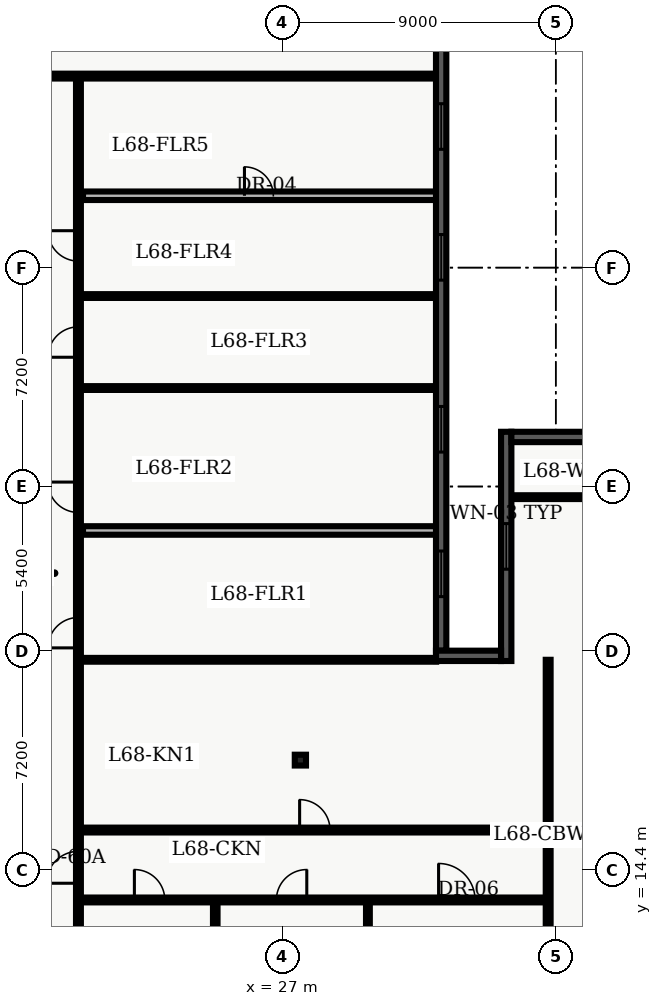
"""IFC4 building model, lengths in metres.
Left out: names, types, materials, properties, quantities, classifications, styles, units other than length and angle.
Written with IfcOpenShell. Run it as: python <this file> out.ifc"""

import sys

from ifc_helpers import new_model, entity, si_unit, converted_unit, direction, frame, origin_with_axes, origin_2d_with_axis, place, context, subcontext, project, spatial, polyline, rectangle, i_section, outline, extrude, element, fill, save


model = new_model("IFC4")
c1 = context("Model", 3, precision=1e-05, world=origin_with_axes(), true_north=direction((0.0, 1.0)))
c2 = subcontext(c1, "Body", "Model", "MODEL_VIEW")
j1 = project(units=[si_unit("LENGTHUNIT", "METRE"), converted_unit("PLANEANGLEUNIT", "DEGREE", entity("IfcPlaneAngleMeasure", 0.017), si_unit("PLANEANGLEUNIT", "RADIAN"), dimensions=[0, 0, 0, 0, 0, 0, 0])], contexts=[c1])
p1 = place(None, origin_with_axes())
s1 = spatial("IfcSite", under=j1, at=p1, CompositionType="ELEMENT")
p2 = place(p1, origin_with_axes())
s2 = spatial("IfcBuilding", under=s1, at=p2, CompositionType="ELEMENT")
p3 = place(p2, frame((0.0, 0.0, 276.3), z_axis=(0.0, 0.0, 1.0), x_axis=(1.0, 0.0, 0.0)))
s3 = spatial("IfcBuildingStorey", under=s2, at=p3, CompositionType="ELEMENT", Elevation=276.3)
p4 = place(p3, frame((27.6, 18.0, 0.0), z_axis=(0.0, 0.0, 1.0), x_axis=(1.0, 0.0, 0.0)))
e1 = element("IfcColumn", 1, at=p4, inside=s3, PredefinedType="COLUMN", context=c2, shape_type="SweptSolid", body=[
    extrude(i_section(OverallWidth=0.369, OverallDepth=0.356, WebThickness=0.011, FlangeThickness=0.018, FilletRadius=0.018, at=origin_2d_with_axis()), origin_with_axes(), (0.0, 0.0, 1.0), 3.9),
])
p5 = place(p3, frame((8.135, 40.5, 0.0), z_axis=(0.0, 0.0, 1.0), x_axis=(1.0, 0.0, 0.0)))
e2 = element("IfcWall", 2, at=p5, inside=s3, PredefinedType="PARTITIONING", context=c2, shape_type="SweptSolid", body=[
    extrude(outline(polyline([(0.0, -0.08), (23.93, -0.08), (23.93, 0.08), (0.0, 0.08), (0.0, -0.08)])), origin_with_axes(), (0.0, 0.0, 1.0), 2.7),
])
p6 = place(p5, frame((0.876, 0.0, 0.0), z_axis=(0.0, 0.0, 1.0), x_axis=(1.0, 0.0, 0.0)))
e3 = element("IfcOpeningElement", 3, at=p6, cuts=e2, PredefinedType="OPENING", context=c2, shape_type="SweptSolid", body=[
    extrude(rectangle(XDim=1.0, YDim=0.18, at=origin_2d_with_axis()), origin_with_axes(), (0.0, 0.0, 1.0), 2.15),
])
p7 = place(p5, frame((5.457, 0.0, 0.0), z_axis=(0.0, 0.0, 1.0), x_axis=(1.0, 0.0, 0.0)))
e4 = element("IfcOpeningElement", 4, at=p7, cuts=e2, PredefinedType="OPENING", context=c2, shape_type="SweptSolid", body=[
    extrude(rectangle(XDim=1.0, YDim=0.18, at=origin_2d_with_axis()), origin_with_axes(), (0.0, 0.0, 1.0), 2.15),
])
p8 = place(p5, frame((9.7, 0.0, 0.0), z_axis=(0.0, 0.0, 1.0), x_axis=(1.0, 0.0, 0.0)))
e5 = element("IfcOpeningElement", 5, at=p8, cuts=e2, PredefinedType="OPENING", context=c2, shape_type="SweptSolid", body=[
    extrude(rectangle(XDim=1.0, YDim=0.18, at=origin_2d_with_axis()), origin_with_axes(), (0.0, 0.0, 1.0), 2.15),
])
p9 = place(p3, frame((20.3, 7.8, 0.0), z_axis=(0.0, 0.0, 1.0), x_axis=(0.0, 1.0, 0.0)))
e6 = element("IfcWall", 6, at=p9, inside=s3, PredefinedType="PARTITIONING", context=c2, shape_type="SweptSolid", body=[
    extrude(outline(polyline([(0.0, -0.08), (32.7, -0.08), (32.7, 0.08), (0.0, 0.08), (0.0, -0.08)])), origin_with_axes(), (0.0, 0.0, 1.0), 2.7),
])
p10 = place(p9, frame((14.392, 0.0, 0.0), z_axis=(0.0, 0.0, 1.0), x_axis=(1.0, 0.0, 0.0)))
e7 = element("IfcOpeningElement", 7, at=p10, cuts=e6, PredefinedType="OPENING", context=c2, shape_type="SweptSolid", body=[
    extrude(rectangle(XDim=1.0, YDim=0.18, at=origin_2d_with_axis()), origin_with_axes(), (0.0, 0.0, 1.0), 2.15),
])
p11 = place(p9, frame((18.846, 0.0, 0.0), z_axis=(0.0, 0.0, 1.0), x_axis=(1.0, 0.0, 0.0)))
e8 = element("IfcOpeningElement", 8, at=p11, cuts=e6, PredefinedType="OPENING", context=c2, shape_type="SweptSolid", body=[
    extrude(rectangle(XDim=1.0, YDim=0.18, at=origin_2d_with_axis()), origin_with_axes(), (0.0, 0.0, 1.0), 2.15),
])
p12 = place(p9, frame((23.952, 0.0, 0.0), z_axis=(0.0, 0.0, 1.0), x_axis=(1.0, 0.0, 0.0)))
e9 = element("IfcOpeningElement", 9, at=p12, cuts=e6, PredefinedType="OPENING", context=c2, shape_type="SweptSolid", body=[
    extrude(rectangle(XDim=1.0, YDim=0.18, at=origin_2d_with_axis()), origin_with_axes(), (0.0, 0.0, 1.0), 2.15),
])
p13 = place(p9, frame((27.114, 0.0, 0.0), z_axis=(0.0, 0.0, 1.0), x_axis=(1.0, 0.0, 0.0)))
e10 = element("IfcOpeningElement", 10, at=p13, cuts=e6, PredefinedType="OPENING", context=c2, shape_type="SweptSolid", body=[
    extrude(rectangle(XDim=1.0, YDim=0.18, at=origin_2d_with_axis()), origin_with_axes(), (0.0, 0.0, 1.0), 2.15),
])
p14 = place(p9, frame((6.675, 0.0, 0.0), z_axis=(0.0, 0.0, 1.0), x_axis=(1.0, 0.0, 0.0)))
e11 = element("IfcOpeningElement", 11, at=p14, cuts=e6, PredefinedType="OPENING", context=c2, shape_type="SweptSolid", body=[
    extrude(rectangle(XDim=1.05, YDim=0.18, at=origin_2d_with_axis()), origin_with_axes(), (0.0, 0.0, 1.0), 2.15),
])
p15 = place(p3, frame((20.45, 25.554, 0.0), z_axis=(0.0, 0.0, 1.0), x_axis=(1.0, 0.0, 0.0)))
e12 = element("IfcWall", 12, at=p15, inside=s3, PredefinedType="PARTITIONING", context=c2, shape_type="SweptSolid", body=[
    extrude(outline(polyline([(0.0, -0.14), (11.615, -0.14), (11.615, 0.14), (0.0, 0.14), (0.0, -0.14)])), origin_with_axes(), (0.0, 0.0, 1.0), 2.7),
])
for number, where, z_axis, x_axis in (
    (13, (20.45, 30.239, 0.0), (0.0, 0.0, 1.0), (1.0, 0.0, 0.0)),
    (14, (20.45, 33.265, 0.0), (0.0, 0.0, 1.0), (1.0, 0.0, 0.0)),
):
    element("IfcWall", number, at=place(p3, frame(where, z_axis=z_axis, x_axis=x_axis)), inside=s3, PredefinedType="PARTITIONING", context=c2, shape_type="SweptSolid", body=[
        extrude(outline(polyline([(0.0, -0.062), (11.615, -0.062), (11.615, 0.062), (0.0, 0.062), (0.0, -0.062)])), origin_with_axes(), (0.0, 0.0, 1.0), 2.7),
    ])
p16 = place(p3, frame((20.45, 36.564, 0.0), z_axis=(0.0, 0.0, 1.0), x_axis=(1.0, 0.0, 0.0)))
e15 = element("IfcWall", 15, at=p16, inside=s3, PredefinedType="PARTITIONING", context=c2, shape_type="SweptSolid", body=[
    extrude(outline(polyline([(0.0, -0.14), (11.615, -0.14), (11.615, 0.14), (0.0, 0.14), (0.0, -0.14)])), origin_with_axes(), (0.0, 0.0, 1.0), 2.7),
])
p17 = place(p16, frame((5.785, 0.0, 0.0), z_axis=(0.0, 0.0, 1.0), x_axis=(1.0, 0.0, 0.0)))
e16 = element("IfcOpeningElement", 16, at=p17, cuts=e15, PredefinedType="OPENING", context=c2, shape_type="SweptSolid", body=[
    extrude(rectangle(XDim=0.95, YDim=0.3, at=origin_2d_with_axis()), origin_with_axes(), (0.0, 0.0, 1.0), 2.15),
])
p18 = place(p3, frame((20.3, 13.4, 0.0), z_axis=(0.0, 0.0, 1.0), x_axis=(1.0, 0.0, 0.0)))
e17 = element("IfcWall", 17, at=p18, inside=s3, PredefinedType="PARTITIONING", context=c2, shape_type="SweptSolid", body=[
    extrude(outline(polyline([(0.0, -0.08), (15.45, -0.08), (15.45, 0.08), (0.0, 0.08), (0.0, -0.08)])), origin_with_axes(), (0.0, 0.0, 1.0), 2.7),
])
p19 = place(p18, frame((2.34, 0.0, 0.0), z_axis=(0.0, 0.0, 1.0), x_axis=(1.0, 0.0, 0.0)))
e18 = element("IfcOpeningElement", 18, at=p19, cuts=e17, PredefinedType="OPENING", context=c2, shape_type="SweptSolid", body=[
    extrude(rectangle(XDim=1.0, YDim=0.18, at=origin_2d_with_axis()), origin_with_axes(), (0.0, 0.0, 1.0), 2.15),
])
p20 = place(p18, frame((7.011, 0.0, 0.0), z_axis=(0.0, 0.0, 1.0), x_axis=(1.0, 0.0, 0.0)))
e19 = element("IfcOpeningElement", 19, at=p20, cuts=e17, PredefinedType="OPENING", context=c2, shape_type="SweptSolid", body=[
    extrude(rectangle(XDim=1.0, YDim=0.18, at=origin_2d_with_axis()), origin_with_axes(), (0.0, 0.0, 1.0), 2.15),
])
p21 = place(p18, frame((12.445, 0.0, 0.0), z_axis=(0.0, 0.0, 1.0), x_axis=(1.0, 0.0, 0.0)))
e20 = element("IfcOpeningElement", 20, at=p21, cuts=e17, PredefinedType="OPENING", context=c2, shape_type="SweptSolid", body=[
    extrude(rectangle(XDim=1.2, YDim=0.18, at=origin_2d_with_axis()), origin_with_axes(), (0.0, 0.0, 1.0), 2.2),
])
p22 = place(p3, frame((20.3, 15.7, 0.0), z_axis=(0.0, 0.0, 1.0), x_axis=(1.0, 0.0, 0.0)))
e21 = element("IfcWall", 21, at=p22, inside=s3, PredefinedType="PARTITIONING", context=c2, shape_type="SweptSolid", body=[
    extrude(outline(polyline([(0.0, -0.08), (15.45, -0.08), (15.45, 0.08), (0.0, 0.08), (0.0, -0.08)])), origin_with_axes(), (0.0, 0.0, 1.0), 2.7),
])
p23 = place(p22, frame((7.775, 0.0, 0.0), z_axis=(0.0, 0.0, 1.0), x_axis=(1.0, 0.0, 0.0)))
e22 = element("IfcOpeningElement", 22, at=p23, cuts=e21, PredefinedType="OPENING", context=c2, shape_type="SweptSolid", body=[
    extrude(rectangle(XDim=1.0, YDim=0.18, at=origin_2d_with_axis()), origin_with_axes(), (0.0, 0.0, 1.0), 2.15),
])
p24 = place(p3, frame((35.75, 4.35, 0.0), z_axis=(0.0, 0.0, 1.0), x_axis=(0.0, 1.0, 0.0)))
e23 = element("IfcWall", 23, at=p24, inside=s3, PredefinedType="PARTITIONING", context=c2, shape_type="SweptSolid", body=[
    extrude(outline(polyline([(0.0, -0.08), (16.95, -0.08), (16.95, 0.08), (0.0, 0.08), (0.0, -0.08)])), origin_with_axes(), (0.0, 0.0, 1.0), 2.7),
])
p25 = place(p3, frame((24.8, 0.335, 0.0), z_axis=(0.0, 0.0, 1.0), x_axis=(0.0, 1.0, 0.0)))
e24 = element("IfcWall", 24, at=p25, inside=s3, PredefinedType="PARTITIONING", context=c2, shape_type="SweptSolid", body=[
    extrude(outline(polyline([(0.0, -0.075), (12.945, -0.075), (12.945, 0.075), (0.0, 0.075), (0.0, -0.075)])), origin_with_axes(), (0.0, 0.0, 1.0), 2.7),
])
p26 = place(p3, frame((29.821, 0.335, 0.0), z_axis=(0.0, 0.0, 1.0), x_axis=(0.0, 1.0, 0.0)))
e25 = element("IfcWall", 25, at=p26, inside=s3, PredefinedType="PARTITIONING", context=c2, shape_type="SweptSolid", body=[
    extrude(outline(polyline([(0.0, -0.062), (12.945, -0.062), (12.945, 0.062), (0.0, 0.062), (0.0, -0.062)])), origin_with_axes(), (0.0, 0.0, 1.0), 2.7),
])
p27 = place(p3, frame((34.535, 26.65, 0.0), z_axis=(0.0, 0.0, 1.0), x_axis=(1.0, 0.0, 0.0)))
e26 = element("IfcWall", 26, at=p27, inside=s3, PredefinedType="PARTITIONING", context=c2, shape_type="SweptSolid", body=[
    extrude(outline(polyline([(0.0, -0.062), (12.995, -0.062), (12.995, 0.062), (0.0, 0.062), (0.0, -0.062)])), origin_with_axes(), (0.0, 0.0, 1.0), 2.7),
])
p28 = place(p27, frame((8.465, 0.0, 0.0), z_axis=(0.0, 0.0, 1.0), x_axis=(1.0, 0.0, 0.0)))
e27 = element("IfcOpeningElement", 27, at=p28, cuts=e26, PredefinedType="OPENING", context=c2, shape_type="SweptSolid", body=[
    extrude(rectangle(XDim=1.0, YDim=0.145, at=origin_2d_with_axis()), origin_with_axes(), (0.0, 0.0, 1.0), 2.15),
])
p29 = place(p3, frame((20.3, 21.3, 0.0), z_axis=(0.0, 0.0, 1.0), x_axis=(1.0, 0.0, 0.0)))
e28 = element("IfcWall", 28, at=p29, inside=s3, PredefinedType="PARTITIONING", context=c2, shape_type="SweptSolid", body=[
    extrude(outline(polyline([(0.0, -0.062), (11.765, -0.062), (11.765, 0.062), (0.0, 0.062), (0.0, -0.062)])), origin_with_axes(), (0.0, 0.0, 1.0), 2.7),
])
p30 = place(p3, frame((34.37, 21.26, 0.0), z_axis=(0.0, 0.0, 1.0), x_axis=(0.0, 1.0, 0.0)))
e29 = element("IfcWall", 29, at=p30, inside=s3, PredefinedType="SOLIDWALL", context=c2, shape_type="SweptSolid", body=[
    extrude(outline(polyline([(0.0, -0.17), (7.54, -0.17), (7.54, 0.17), (0.0, 0.17), (0.0, -0.17)])), origin_with_axes(), (0.0, 0.0, 1.0), 3.66),
])
p31 = place(p30, frame((3.77, 0.0, 0.45), z_axis=(0.0, 0.0, 1.0), x_axis=(1.0, 0.0, 0.0)))
e30 = element("IfcOpeningElement", 30, at=p31, cuts=e29, PredefinedType="OPENING", context=c2, shape_type="SweptSolid", body=[
    extrude(rectangle(XDim=1.5, YDim=0.36, at=origin_2d_with_axis()), origin_with_axes(), (0.0, 0.0, 1.0), 2.1),
])
p32 = place(p3, frame((34.54, 28.63, 0.0), z_axis=(0.0, 0.0, 1.0), x_axis=(1.0, 0.0, 0.0)))
e31 = element("IfcWall", 31, at=p32, inside=s3, PredefinedType="SOLIDWALL", context=c2, shape_type="SweptSolid", body=[
    extrude(outline(polyline([(0.0, -0.17), (13.16, -0.17), (13.16, 0.17), (0.0, 0.17), (0.0, -0.17)])), origin_with_axes(), (0.0, 0.0, 1.0), 3.66),
])
p33 = place(p32, frame((3.59, 0.0, 0.45), z_axis=(0.0, 0.0, 1.0), x_axis=(1.0, 0.0, 0.0)))
e32 = element("IfcOpeningElement", 32, at=p33, cuts=e31, PredefinedType="OPENING", context=c2, shape_type="SweptSolid", body=[
    extrude(rectangle(XDim=1.5, YDim=0.36, at=origin_2d_with_axis()), origin_with_axes(), (0.0, 0.0, 1.0), 2.1),
])
p34 = place(p32, frame((9.57, 0.0, 0.45), z_axis=(0.0, 0.0, 1.0), x_axis=(1.0, 0.0, 0.0)))
e33 = element("IfcOpeningElement", 33, at=p34, cuts=e31, PredefinedType="OPENING", context=c2, shape_type="SweptSolid", body=[
    extrude(rectangle(XDim=1.5, YDim=0.36, at=origin_2d_with_axis()), origin_with_axes(), (0.0, 0.0, 1.0), 2.1),
])
p35 = place(p3, frame((32.23, 41.82, 0.0), z_axis=(0.0, 0.0, 1.0), x_axis=(0.0, -1.0, 0.0)))
e34 = element("IfcWall", 34, at=p35, inside=s3, PredefinedType="SOLIDWALL", context=c2, shape_type="SweptSolid", body=[
    extrude(outline(polyline([(0.0, -0.17), (20.22, -0.17), (20.22, 0.17), (0.0, 0.17), (0.0, -0.17)])), origin_with_axes(), (0.0, 0.0, 1.0), 3.66),
])
p36 = place(p35, frame((2.978, 0.0, 0.45), z_axis=(0.0, 0.0, 1.0), x_axis=(1.0, 0.0, 0.0)))
e35 = element("IfcOpeningElement", 35, at=p36, cuts=e34, PredefinedType="OPENING", context=c2, shape_type="SweptSolid", body=[
    extrude(rectangle(XDim=1.5, YDim=0.36, at=origin_2d_with_axis()), origin_with_axes(), (0.0, 0.0, 1.0), 2.1),
])
p37 = place(p35, frame((7.282, 0.0, 0.45), z_axis=(0.0, 0.0, 1.0), x_axis=(1.0, 0.0, 0.0)))
e36 = element("IfcOpeningElement", 36, at=p37, cuts=e34, PredefinedType="OPENING", context=c2, shape_type="SweptSolid", body=[
    extrude(rectangle(XDim=1.5, YDim=0.36, at=origin_2d_with_axis()), origin_with_axes(), (0.0, 0.0, 1.0), 2.1),
])
p38 = place(p35, frame((12.937, 0.0, 0.45), z_axis=(0.0, 0.0, 1.0), x_axis=(1.0, 0.0, 0.0)))
e37 = element("IfcOpeningElement", 37, at=p38, cuts=e34, PredefinedType="OPENING", context=c2, shape_type="SweptSolid", body=[
    extrude(rectangle(XDim=1.5, YDim=0.36, at=origin_2d_with_axis()), origin_with_axes(), (0.0, 0.0, 1.0), 2.1),
])
p39 = place(p35, frame((17.692, 0.0, 0.45), z_axis=(0.0, 0.0, 1.0), x_axis=(1.0, 0.0, 0.0)))
e38 = element("IfcOpeningElement", 38, at=p39, cuts=e34, PredefinedType="OPENING", context=c2, shape_type="SweptSolid", body=[
    extrude(rectangle(XDim=1.5, YDim=0.36, at=origin_2d_with_axis()), origin_with_axes(), (0.0, 0.0, 1.0), 2.1),
])
p40 = place(p3, frame((32.06, 21.43, 0.0), z_axis=(0.0, 0.0, 1.0), x_axis=(1.0, 0.0, 0.0)))
e39 = element("IfcWall", 39, at=p40, inside=s3, PredefinedType="SOLIDWALL", context=c2, shape_type="SweptSolid", body=[
    extrude(outline(polyline([(0.0, -0.17), (2.14, -0.17), (2.14, 0.17), (0.0, 0.17), (0.0, -0.17)])), origin_with_axes(), (0.0, 0.0, 1.0), 3.66),
])
p41 = place(p9, frame((14.392, 0.0, 0.0), z_axis=(0.0, 0.0, 1.0), x_axis=(1.0, 0.0, 0.0)))
e40 = element("IfcDoor", 40, at=p41, inside=s3, OperationType="SINGLE_SWING_LEFT", PredefinedType="DOOR", context=c2, shape_type="SweptSolid", body=[
    extrude(rectangle(XDim=1.0, YDim=0.09, at=origin_2d_with_axis()), origin_with_axes(), (0.0, 0.0, 1.0), 2.15),
])
fill(e7, e40)
p42 = place(p9, frame((18.846, 0.0, 0.0), z_axis=(0.0, 0.0, 1.0), x_axis=(1.0, 0.0, 0.0)))
e41 = element("IfcDoor", 41, at=p42, inside=s3, OperationType="SINGLE_SWING_RIGHT", PredefinedType="DOOR", context=c2, shape_type="SweptSolid", body=[
    extrude(rectangle(XDim=1.0, YDim=0.09, at=origin_2d_with_axis()), origin_with_axes(), (0.0, 0.0, 1.0), 2.15),
])
fill(e8, e41)
p43 = place(p9, frame((23.952, 0.0, 0.0), z_axis=(0.0, 0.0, 1.0), x_axis=(1.0, 0.0, 0.0)))
e42 = element("IfcDoor", 42, at=p43, inside=s3, OperationType="SINGLE_SWING_LEFT", PredefinedType="DOOR", context=c2, shape_type="SweptSolid", body=[
    extrude(rectangle(XDim=1.0, YDim=0.09, at=origin_2d_with_axis()), origin_with_axes(), (0.0, 0.0, 1.0), 2.15),
])
fill(e9, e42)
p44 = place(p9, frame((27.114, 0.0, 0.0), z_axis=(0.0, 0.0, 1.0), x_axis=(1.0, 0.0, 0.0)))
e43 = element("IfcDoor", 43, at=p44, inside=s3, OperationType="SINGLE_SWING_RIGHT", PredefinedType="DOOR", context=c2, shape_type="SweptSolid", body=[
    extrude(rectangle(XDim=1.0, YDim=0.09, at=origin_2d_with_axis()), origin_with_axes(), (0.0, 0.0, 1.0), 2.15),
])
fill(e10, e43)
p45 = place(p16, frame((5.785, 0.0, 0.0), z_axis=(0.0, 0.0, 1.0), x_axis=(1.0, 0.0, 0.0)))
e44 = element("IfcDoor", 44, at=p45, inside=s3, OperationType="SINGLE_SWING_LEFT", PredefinedType="DOOR", context=c2, shape_type="SweptSolid", body=[
    extrude(rectangle(XDim=0.95, YDim=0.09, at=origin_2d_with_axis()), origin_with_axes(), (0.0, 0.0, 1.0), 2.15),
])
fill(e16, e44)
p46 = place(p9, frame((6.675, 0.0, 0.0), z_axis=(0.0, 0.0, 1.0), x_axis=(1.0, 0.0, 0.0)))
e45 = element("IfcDoor", 45, at=p46, inside=s3, OperationType="SINGLE_SWING_LEFT", PredefinedType="DOOR", context=c2, shape_type="SweptSolid", body=[
    extrude(rectangle(XDim=1.05, YDim=0.09, at=origin_2d_with_axis()), origin_with_axes(), (0.0, 0.0, 1.0), 2.15),
])
fill(e11, e45)
p47 = place(p18, frame((2.34, 0.0, 0.0), z_axis=(0.0, 0.0, 1.0), x_axis=(1.0, 0.0, 0.0)))
e46 = element("IfcDoor", 46, at=p47, inside=s3, OperationType="SINGLE_SWING_LEFT", PredefinedType="DOOR", context=c2, shape_type="SweptSolid", body=[
    extrude(rectangle(XDim=1.0, YDim=0.09, at=origin_2d_with_axis()), origin_with_axes(), (0.0, 0.0, 1.0), 2.15),
])
fill(e18, e46)
p48 = place(p18, frame((7.011, 0.0, 0.0), z_axis=(0.0, 0.0, 1.0), x_axis=(1.0, 0.0, 0.0)))
e47 = element("IfcDoor", 47, at=p48, inside=s3, OperationType="SINGLE_SWING_RIGHT", PredefinedType="DOOR", context=c2, shape_type="SweptSolid", body=[
    extrude(rectangle(XDim=1.0, YDim=0.09, at=origin_2d_with_axis()), origin_with_axes(), (0.0, 0.0, 1.0), 2.15),
])
fill(e19, e47)
p49 = place(p18, frame((12.445, 0.0, 0.0), z_axis=(0.0, 0.0, 1.0), x_axis=(1.0, 0.0, 0.0)))
e48 = element("IfcDoor", 48, at=p49, inside=s3, OperationType="SINGLE_SWING_LEFT", PredefinedType="DOOR", context=c2, shape_type="SweptSolid", body=[
    extrude(rectangle(XDim=1.2, YDim=0.09, at=origin_2d_with_axis()), origin_with_axes(), (0.0, 0.0, 1.0), 2.2),
])
fill(e20, e48)
p50 = place(p22, frame((7.775, 0.0, 0.0), z_axis=(0.0, 0.0, 1.0), x_axis=(1.0, 0.0, 0.0)))
e49 = element("IfcDoor", 49, at=p50, inside=s3, OperationType="SINGLE_SWING_LEFT", PredefinedType="DOOR", context=c2, shape_type="SweptSolid", body=[
    extrude(rectangle(XDim=1.0, YDim=0.09, at=origin_2d_with_axis()), origin_with_axes(), (0.0, 0.0, 1.0), 2.15),
])
fill(e22, e49)
p51 = place(p30, frame((3.77, 0.0, 0.45), z_axis=(0.0, 0.0, 1.0), x_axis=(1.0, 0.0, 0.0)))
e50 = element("IfcWindow", 50, at=p51, inside=s3, PredefinedType="WINDOW", context=c2, shape_type="SweptSolid", body=[
    extrude(rectangle(XDim=1.5, YDim=0.09, at=origin_2d_with_axis()), origin_with_axes(), (0.0, 0.0, 1.0), 2.1),
])
fill(e30, e50)
p52 = place(p35, frame((2.978, 0.0, 0.45), z_axis=(0.0, 0.0, 1.0), x_axis=(1.0, 0.0, 0.0)))
e51 = element("IfcWindow", 51, at=p52, inside=s3, PredefinedType="WINDOW", context=c2, shape_type="SweptSolid", body=[
    extrude(rectangle(XDim=1.5, YDim=0.09, at=origin_2d_with_axis()), origin_with_axes(), (0.0, 0.0, 1.0), 2.1),
])
fill(e35, e51)
p53 = place(p35, frame((7.282, 0.0, 0.45), z_axis=(0.0, 0.0, 1.0), x_axis=(1.0, 0.0, 0.0)))
e52 = element("IfcWindow", 52, at=p53, inside=s3, PredefinedType="WINDOW", context=c2, shape_type="SweptSolid", body=[
    extrude(rectangle(XDim=1.5, YDim=0.09, at=origin_2d_with_axis()), origin_with_axes(), (0.0, 0.0, 1.0), 2.1),
])
fill(e36, e52)
p54 = place(p35, frame((12.937, 0.0, 0.45), z_axis=(0.0, 0.0, 1.0), x_axis=(1.0, 0.0, 0.0)))
e53 = element("IfcWindow", 53, at=p54, inside=s3, PredefinedType="WINDOW", context=c2, shape_type="SweptSolid", body=[
    extrude(rectangle(XDim=1.5, YDim=0.09, at=origin_2d_with_axis()), origin_with_axes(), (0.0, 0.0, 1.0), 2.1),
])
fill(e37, e53)
p55 = place(p35, frame((17.692, 0.0, 0.45), z_axis=(0.0, 0.0, 1.0), x_axis=(1.0, 0.0, 0.0)))
e54 = element("IfcWindow", 54, at=p55, inside=s3, PredefinedType="WINDOW", context=c2, shape_type="SweptSolid", body=[
    extrude(rectangle(XDim=1.5, YDim=0.09, at=origin_2d_with_axis()), origin_with_axes(), (0.0, 0.0, 1.0), 2.1),
])
fill(e38, e54)
save(model, sys.argv[1])
